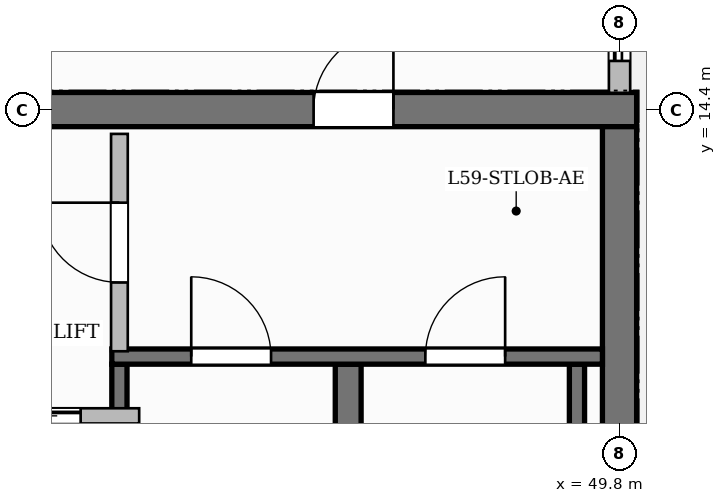
"""IFC4 building model, lengths in metres.
Left out: names, types, materials, properties, quantities, classifications, styles, units other than length and angle.
Written with IfcOpenShell. Run it as: python <this file> out.ifc"""

import sys

from ifc_helpers import new_model, si_unit, direction, frame, frame_2d, origin, place, context, subcontext, project, spatial, rectangle, extrude, source, transform, mapped, element, fill, save


model = new_model("IFC4")
c1 = context("Model", 3, precision=1e-05, world=origin(), true_north=direction((0.0, 1.0)))
c2 = subcontext(c1, "Body", "Model", "MODEL_VIEW")
j1 = project(units=[si_unit("LENGTHUNIT", "METRE"), si_unit("PLANEANGLEUNIT", "RADIAN")], contexts=[c1])
p1 = place(None, origin())
s1 = spatial("IfcSite", under=j1, at=p1, CompositionType="ELEMENT")
p2 = place(p1, origin())
s2 = spatial("IfcBuilding", under=s1, at=p2, CompositionType="ELEMENT")
p3 = place(p2, frame((0.0, 0.0, 236.55)))
s3 = spatial("IfcBuildingStorey", under=s2, at=p3, CompositionType="ELEMENT", Elevation=236.55)
p4 = place(p3, frame((34.575, 14.4, 0.0), z_axis=(0.0, 0.0, 1.0), x_axis=(1.0, 0.0, 0.0)))
e1 = element("IfcWall", 1, at=p4, inside=s3, PredefinedType="SHEAR", context=c2, shape_type="SweptSolid", body=[
    extrude(rectangle(XDim=15.45, YDim=0.45, at=frame_2d((7.725, 0.0))), origin(), (0.0, 0.0, 1.0), 3.85),
])
p5 = place(p4, frame((5.355, 0.0, 0.0)))
e2 = element("IfcOpeningElement", 2, at=p5, cuts=e1, PredefinedType="OPENING", context=c2, shape_type="SweptSolid", body=[
    extrude(rectangle(XDim=1.5, YDim=2.2, at=frame_2d((0.75, 1.1))), frame((0.0, 0.235, 0.0), z_axis=(0.0, -1.0, 0.0), x_axis=(1.0, 0.0, 0.0)), (0.0, 0.0, 1.0), 0.47),
])
p6 = place(p4, frame((1.57, 0.0, 0.0)))
e3 = element("IfcOpeningElement", 3, at=p6, cuts=e1, PredefinedType="OPENING", context=c2, shape_type="SweptSolid", body=[
    extrude(rectangle(XDim=1.05, YDim=2.15, at=frame_2d((0.525, 1.075))), frame((0.0, 0.235, 0.0), z_axis=(0.0, -1.0, 0.0), x_axis=(1.0, 0.0, 0.0)), (0.0, 0.0, 1.0), 0.47),
])
p7 = place(p4, frame((11.2, 0.0, 0.0)))
e4 = element("IfcOpeningElement", 4, at=p7, cuts=e1, PredefinedType="OPENING", context=c2, shape_type="SweptSolid", body=[
    extrude(rectangle(XDim=1.05, YDim=2.15, at=frame_2d((0.525, 1.075))), frame((0.0, 0.235, 0.0), z_axis=(0.0, -1.0, 0.0), x_axis=(1.0, 0.0, 0.0)), (0.0, 0.0, 1.0), 0.47),
])
p8 = place(p3, frame((49.8, 3.825, 0.0), z_axis=(0.0, 0.0, 1.0), x_axis=(0.0, 1.0, 0.0)))
e5 = element("IfcWall", 5, at=p8, inside=s3, PredefinedType="SHEAR", context=c2, shape_type="SweptSolid", body=[
    extrude(rectangle(XDim=10.35, YDim=0.45, at=frame_2d((5.175, 0.0))), origin(), (0.0, 0.0, 1.0), 3.85),
])
p9 = place(p3, frame((43.22, 4.1, 0.0), z_axis=(0.0, 0.0, 1.0), x_axis=(0.0, 1.0, 0.0)))
e6 = element("IfcWall", 6, at=p9, inside=s3, PredefinedType="SHEAR", context=c2, shape_type="SweptSolid", body=[
    extrude(rectangle(XDim=6.95, YDim=0.2, at=frame_2d((3.475, 0.0))), origin(), (0.0, 0.0, 1.0), 3.85),
])
p10 = place(p3, frame((46.23, 4.1, 0.0), z_axis=(0.0, 0.0, 1.0), x_axis=(0.0, 1.0, 0.0)))
e7 = element("IfcWall", 7, at=p10, inside=s3, PredefinedType="SHEAR", context=c2, shape_type="SweptSolid", body=[
    extrude(rectangle(XDim=6.95, YDim=0.34, at=frame_2d((3.475, 0.0))), origin(), (0.0, 0.0, 1.0), 3.85),
])
p11 = place(p3, frame((49.24, 4.1, 0.0), z_axis=(0.0, 0.0, 1.0), x_axis=(0.0, 1.0, 0.0)))
e8 = element("IfcWall", 8, at=p11, inside=s3, PredefinedType="SHEAR", context=c2, shape_type="SweptSolid", body=[
    extrude(rectangle(XDim=6.95, YDim=0.2, at=frame_2d((3.475, 0.0))), origin(), (0.0, 0.0, 1.0), 3.85),
])
p12 = place(p3, frame((43.12, 11.15, 0.0), z_axis=(0.0, 0.0, 1.0), x_axis=(1.0, 0.0, 0.0)))
e9 = element("IfcWall", 9, at=p12, inside=s3, PredefinedType="SHEAR", context=c2, shape_type="SweptSolid", body=[
    extrude(rectangle(XDim=6.455, YDim=0.2, at=frame_2d((3.228, 0.0))), origin(), (0.0, 0.0, 1.0), 3.85),
])
p13 = place(p12, frame((1.045, 0.0, 0.0)))
e10 = element("IfcOpeningElement", 10, at=p13, cuts=e9, PredefinedType="OPENING", context=c2, shape_type="SweptSolid", body=[
    extrude(rectangle(XDim=1.05, YDim=2.2, at=frame_2d((0.525, 1.1))), frame((0.0, 0.11, 0.0), z_axis=(0.0, -1.0, 0.0), x_axis=(1.0, 0.0, 0.0)), (0.0, 0.0, 1.0), 0.22),
])
p14 = place(p12, frame((4.125, 0.0, 0.0)))
e11 = element("IfcOpeningElement", 11, at=p14, cuts=e9, PredefinedType="OPENING", context=c2, shape_type="SweptSolid", body=[
    extrude(rectangle(XDim=1.05, YDim=2.2, at=frame_2d((0.525, 1.1))), frame((0.0, 0.11, 0.0), z_axis=(0.0, -1.0, 0.0), x_axis=(1.0, 0.0, 0.0)), (0.0, 0.0, 1.0), 0.22),
])
p15 = place(p3, frame((43.22, 11.22, 0.0), z_axis=(0.0, 0.0, 1.0), x_axis=(0.0, 1.0, 0.0)))
e12 = element("IfcWall", 12, at=p15, inside=s3, PredefinedType="PARTITIONING", context=c2, shape_type="SweptSolid", body=[
    extrude(rectangle(XDim=2.86, YDim=0.22, at=frame_2d((1.43, 0.0))), origin(), (0.0, 0.0, 1.0), 3.6),
])
p16 = place(p15, frame((0.905, 0.0, 0.0)))
e13 = element("IfcOpeningElement", 13, at=p16, cuts=e12, PredefinedType="OPENING", context=c2, shape_type="SweptSolid", body=[
    extrude(rectangle(XDim=1.05, YDim=2.15, at=frame_2d((0.525, 1.075))), frame((0.0, 0.12, 0.0), z_axis=(0.0, -1.0, 0.0), x_axis=(1.0, 0.0, 0.0)), (0.0, 0.0, 1.0), 0.24),
])
p17 = place(p3, frame((40.84, 10.37, 0.0), z_axis=(0.0, 0.0, 1.0), x_axis=(1.0, 0.0, 0.0)))
e14 = element("IfcWall", 14, at=p17, inside=s3, PredefinedType="PARTITIONING", context=c2, shape_type="SweptSolid", body=[
    extrude(rectangle(XDim=2.64, YDim=0.2, at=frame_2d((1.32, 0.0))), origin(), (0.0, 0.0, 1.0), 3.6),
])
p18 = place(p17, frame((0.77, 0.0, 0.0)))
e15 = element("IfcOpeningElement", 15, at=p18, cuts=e14, PredefinedType="OPENING", context=c2, shape_type="SweptSolid", body=[
    extrude(rectangle(XDim=1.1, YDim=2.2, at=frame_2d((0.55, 1.1))), frame((0.0, 0.11, 0.0), z_axis=(0.0, -1.0, 0.0), x_axis=(1.0, 0.0, 0.0)), (0.0, 0.0, 1.0), 0.22),
])
p19 = place(p3, frame((49.8, 14.62, 0.0), z_axis=(0.0, 0.0, 1.0), x_axis=(0.0, 1.0, 0.0)))
e16 = element("IfcWall", 16, at=p19, inside=s3, PredefinedType="SOLIDWALL", context=c2, shape_type="SweptSolid", body=[
    extrude(rectangle(XDim=6.93, YDim=0.28, at=frame_2d((3.465, 0.0))), origin(), (0.0, 0.0, 1.0), 3.135),
])
p20 = place(p19, frame((0.42, 0.0, 0.0)))
e17 = element("IfcOpeningElement", 17, at=p20, cuts=e16, PredefinedType="OPENING", context=c2, shape_type="SweptSolid", body=[
    extrude(rectangle(XDim=1.2, YDim=2.2, at=frame_2d((0.6, 1.1))), frame((0.0, 0.15, 0.0), z_axis=(0.0, -1.0, 0.0), x_axis=(1.0, 0.0, 0.0)), (0.0, 0.0, 1.0), 0.3),
])
p21 = place(p19, frame((3.659, 0.0, 0.8)))
e18 = element("IfcOpeningElement", 18, at=p21, cuts=e16, PredefinedType="OPENING", context=c2, shape_type="SweptSolid", body=[
    extrude(rectangle(XDim=1.8, YDim=1.85, at=frame_2d((0.9, 0.925))), frame((0.0, 0.15, 0.0), z_axis=(0.0, -1.0, 0.0), x_axis=(1.0, 0.0, 0.0)), (0.0, 0.0, 1.0), 0.3),
])
m1 = source(origin(), c2, "Body", "SweptSolid", [
    extrude(rectangle(XDim=1.05, YDim=2.2, at=frame_2d((0.525, 1.1))), frame((0.0, 0.025, 0.0), z_axis=(0.0, -1.0, 0.0), x_axis=(1.0, 0.0, 0.0)), (0.0, 0.0, 1.0), 0.05),
])
p22 = place(p13, origin())
e19 = element("IfcDoor", 19, at=p22, inside=s3, OperationType="SINGLE_SWING_LEFT", PredefinedType="DOOR", context=c2, shape_type="MappedRepresentation", body=[
    mapped(m1, transform((0.0, 0.0, 0.0), scale=1.0)),
])
fill(e10, e19)
p23 = place(p14, origin())
e20 = element("IfcDoor", 20, at=p23, inside=s3, OperationType="SINGLE_SWING_RIGHT", PredefinedType="DOOR", context=c2, shape_type="MappedRepresentation", body=[
    mapped(m1, transform((0.0, 0.0, 0.0), scale=1.0)),
])
fill(e11, e20)
m2 = source(origin(), c2, "Body", "SweptSolid", [
    extrude(rectangle(XDim=1.05, YDim=2.15, at=frame_2d((0.525, 1.075))), frame((0.0, 0.025, 0.0), z_axis=(0.0, -1.0, 0.0), x_axis=(1.0, 0.0, 0.0)), (0.0, 0.0, 1.0), 0.05),
])
p24 = place(p16, origin())
e21 = element("IfcDoor", 21, at=p24, inside=s3, OperationType="SINGLE_SWING_RIGHT", PredefinedType="DOOR", context=c2, shape_type="MappedRepresentation", body=[
    mapped(m2, transform((0.0, 0.0, 0.0), scale=1.0)),
])
fill(e13, e21)
p25 = place(p7, origin())
e22 = element("IfcDoor", 22, at=p25, inside=s3, OperationType="SINGLE_SWING_RIGHT", PredefinedType="DOOR", context=c2, shape_type="MappedRepresentation", body=[
    mapped(m2, transform((0.0, 0.0, 0.0), scale=1.0)),
])
fill(e4, e22)
m3 = source(origin(), c2, "Body", "SweptSolid", [
    extrude(rectangle(XDim=1.1, YDim=2.2, at=frame_2d((0.55, 1.1))), frame((0.0, 0.025, 0.0), z_axis=(0.0, -1.0, 0.0), x_axis=(1.0, 0.0, 0.0)), (0.0, 0.0, 1.0), 0.05),
])
p26 = place(p18, origin())
e23 = element("IfcDoor", 23, at=p26, inside=s3, OperationType="SLIDING_TO_LEFT", PredefinedType="DOOR", context=c2, shape_type="MappedRepresentation", body=[
    mapped(m3, transform((0.0, 0.0, 0.0), scale=1.0)),
])
fill(e15, e23)
m4 = source(origin(), c2, "Body", "SweptSolid", [
    extrude(rectangle(XDim=1.2, YDim=2.2, at=frame_2d((0.6, 1.1))), frame((0.0, 0.025, 0.0), z_axis=(0.0, -1.0, 0.0), x_axis=(1.0, 0.0, 0.0)), (0.0, 0.0, 1.0), 0.05),
])
p27 = place(p20, origin())
e24 = element("IfcDoor", 24, at=p27, inside=s3, OperationType="SLIDING_TO_LEFT", PredefinedType="DOOR", context=c2, shape_type="MappedRepresentation", body=[
    mapped(m4, transform((0.0, 0.0, 0.0), scale=1.0)),
])
fill(e17, e24)
save(model, sys.argv[1])
